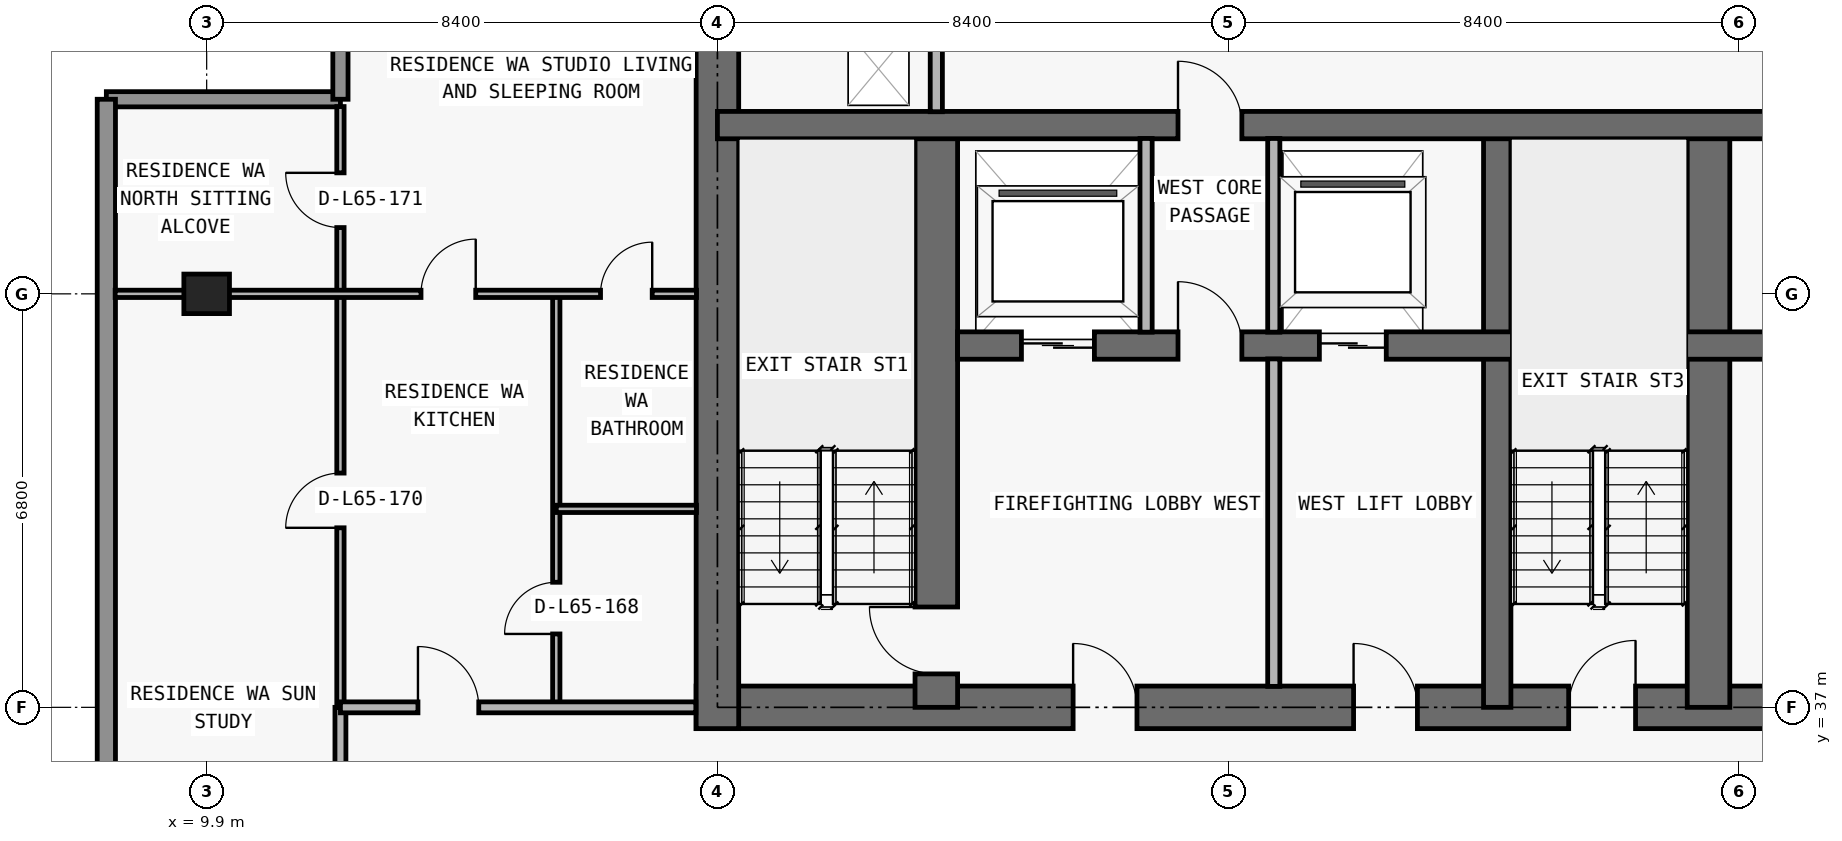
"""IFC4 building model, lengths in metres.
Left out: names, types, materials, properties, quantities, classifications, styles, units other than length and angle.
Written with IfcOpenShell. Run it as: python <this file> out.ifc"""

import sys

from ifc_helpers import new_model, si_unit, direction, frame, frame_2d, origin, origin_2d, place, context, subcontext, project, spatial, rectangle, extrude, element, fill, save


model = new_model("IFC4")
c1 = context("Model", 3, precision=1e-05, world=origin(), true_north=direction((0.0, 1.0)))
c2 = subcontext(c1, "Body", "Model", "MODEL_VIEW")
j1 = project(units=[si_unit("LENGTHUNIT", "METRE"), si_unit("PLANEANGLEUNIT", "RADIAN")], contexts=[c1])
p1 = place(None, origin())
s1 = spatial("IfcSite", under=j1, at=p1, CompositionType="ELEMENT")
p2 = place(p1, origin())
s2 = spatial("IfcBuilding", under=s1, at=p2, CompositionType="ELEMENT")
p3 = place(p2, frame((0.0, 0.0, 233.1)))
s3 = spatial("IfcBuildingStorey", under=s2, at=p3, CompositionType="ELEMENT", Elevation=233.1)
p4 = place(p3, frame((9.9, 43.8, 0.0), z_axis=(0.0, 0.0, 1.0), x_axis=(1.0, 0.0, 0.0)))
e1 = element("IfcColumn", 1, at=p4, inside=s3, PredefinedType="COLUMN", context=c2, shape_type="SweptSolid", body=[
    extrude(rectangle(XDim=0.75, YDim=0.65, at=origin_2d()), origin(), (0.0, 0.0, 1.0), 3.05),
])
p5 = place(p3, frame((17.95, 37.0, 0.0), z_axis=(0.0, 0.0, 1.0), x_axis=(1.0, 0.0, 0.0)))
e2 = element("IfcWall", 2, at=p5, inside=s3, PredefinedType="SHEAR", context=c2, shape_type="SweptSolid", body=[
    extrude(rectangle(XDim=41.9, YDim=0.7, at=frame_2d((20.95, 0.0))), origin(), (0.0, 0.0, 1.0), 3.05),
])
p6 = place(p5, frame((14.35, 0.0, 0.0)))
e3 = element("IfcOpeningElement", 3, at=p6, cuts=e2, PredefinedType="OPENING", context=c2, shape_type="SweptSolid", body=[
    extrude(rectangle(XDim=1.1, YDim=2.15, at=frame_2d((0.55, 1.075))), frame((0.0, 0.36, 0.0), z_axis=(0.0, -1.0, 0.0), x_axis=(1.0, 0.0, 0.0)), (0.0, 0.0, 1.0), 0.72),
])
p7 = place(p5, frame((6.2, 0.0, 0.0)))
e4 = element("IfcOpeningElement", 4, at=p7, cuts=e2, PredefinedType="OPENING", context=c2, shape_type="SweptSolid", body=[
    extrude(rectangle(XDim=1.05, YDim=2.15, at=frame_2d((0.525, 1.075))), frame((0.0, 0.36, 0.0), z_axis=(0.0, -1.0, 0.0), x_axis=(1.0, 0.0, 0.0)), (0.0, 0.0, 1.0), 0.72),
])
p8 = place(p5, frame((34.7, 0.0, 0.0)))
e5 = element("IfcOpeningElement", 5, at=p8, cuts=e2, PredefinedType="OPENING", context=c2, shape_type="SweptSolid", body=[
    extrude(rectangle(XDim=1.05, YDim=2.15, at=frame_2d((0.525, 1.075))), frame((0.0, 0.36, 0.0), z_axis=(0.0, -1.0, 0.0), x_axis=(1.0, 0.0, 0.0)), (0.0, 0.0, 1.0), 0.72),
])
p9 = place(p5, frame((10.812, 0.0, 0.0)))
e6 = element("IfcOpeningElement", 6, at=p9, cuts=e2, PredefinedType="OPENING", context=c2, shape_type="SweptSolid", body=[
    extrude(rectangle(XDim=1.05, YDim=2.15, at=frame_2d((0.525, 1.075))), frame((0.0, 0.36, 0.0), z_axis=(0.0, -1.0, 0.0), x_axis=(1.0, 0.0, 0.0)), (0.0, 0.0, 1.0), 0.72),
])
p10 = place(p5, frame((24.05, 0.0, 0.0)))
e7 = element("IfcOpeningElement", 7, at=p10, cuts=e2, PredefinedType="OPENING", context=c2, shape_type="SweptSolid", body=[
    extrude(rectangle(XDim=1.05, YDim=2.15, at=frame_2d((0.525, 1.075))), frame((0.0, 0.36, 0.0), z_axis=(0.0, -1.0, 0.0), x_axis=(1.0, 0.0, 0.0)), (0.0, 0.0, 1.0), 0.72),
])
p11 = place(p3, frame((18.3, 36.65, 0.0), z_axis=(0.0, 0.0, 1.0), x_axis=(0.0, 1.0, 0.0)))
e8 = element("IfcWall", 8, at=p11, inside=s3, PredefinedType="SHEAR", context=c2, shape_type="SweptSolid", body=[
    extrude(rectangle(XDim=13.95, YDim=0.7, at=frame_2d((6.975, 0.0))), origin(), (0.0, 0.0, 1.0), 3.05),
])
p12 = place(p3, frame((21.9, 37.0, 0.0), z_axis=(0.0, 0.0, 1.0), x_axis=(0.0, 1.0, 0.0)))
e9 = element("IfcWall", 9, at=p12, inside=s3, PredefinedType="SHEAR", context=c2, shape_type="SweptSolid", body=[
    extrude(rectangle(XDim=9.575, YDim=0.7, at=frame_2d((4.788, 0.0))), origin(), (0.0, 0.0, 1.0), 3.05),
])
p13 = place(p12, frame((0.55, 0.0, 0.0)))
e10 = element("IfcOpeningElement", 10, at=p13, cuts=e9, PredefinedType="OPENING", context=c2, shape_type="SweptSolid", body=[
    extrude(rectangle(XDim=1.1, YDim=2.15, at=frame_2d((0.55, 1.075))), frame((0.0, 0.36, 0.0), z_axis=(0.0, -1.0, 0.0), x_axis=(1.0, 0.0, 0.0)), (0.0, 0.0, 1.0), 0.72),
])
p14 = place(p3, frame((31.125, 37.0, 0.0), z_axis=(0.0, 0.0, 1.0), x_axis=(0.0, 1.0, 0.0)))
e11 = element("IfcWall", 11, at=p14, inside=s3, PredefinedType="SHEAR", context=c2, shape_type="SweptSolid", body=[
    extrude(rectangle(XDim=9.575, YDim=0.45, at=frame_2d((4.788, 0.0))), origin(), (0.0, 0.0, 1.0), 3.05),
])
p15 = place(p3, frame((34.6, 37.0, 0.0), z_axis=(0.0, 0.0, 1.0), x_axis=(0.0, 1.0, 0.0)))
e12 = element("IfcWall", 12, at=p15, inside=s3, PredefinedType="SHEAR", context=c2, shape_type="SweptSolid", body=[
    extrude(rectangle(XDim=9.575, YDim=0.7, at=frame_2d((4.788, 0.0))), origin(), (0.0, 0.0, 1.0), 3.05),
])
p16 = place(p3, frame((22.25, 42.95, 0.0), z_axis=(0.0, 0.0, 1.0), x_axis=(1.0, 0.0, 0.0)))
e13 = element("IfcWall", 13, at=p16, inside=s3, PredefinedType="SHEAR", context=c2, shape_type="SweptSolid", body=[
    extrude(rectangle(XDim=33.3, YDim=0.45, at=frame_2d((16.65, 0.0))), origin(), (0.0, 0.0, 1.0), 3.05),
])
p17 = place(p16, frame((1.05, 0.0, 0.0)))
e14 = element("IfcOpeningElement", 14, at=p17, cuts=e13, PredefinedType="OPENING", context=c2, shape_type="SweptSolid", body=[
    extrude(rectangle(XDim=1.2, YDim=2.2, at=frame_2d((0.6, 1.1))), frame((0.0, 0.235, 0.0), z_axis=(0.0, -1.0, 0.0), x_axis=(1.0, 0.0, 0.0)), (0.0, 0.0, 1.0), 0.47),
])
p18 = place(p16, frame((31.05, 0.0, 0.0)))
e15 = element("IfcOpeningElement", 15, at=p18, cuts=e13, PredefinedType="OPENING", context=c2, shape_type="SweptSolid", body=[
    extrude(rectangle(XDim=1.2, YDim=2.2, at=frame_2d((0.6, 1.1))), frame((0.0, 0.235, 0.0), z_axis=(0.0, -1.0, 0.0), x_axis=(1.0, 0.0, 0.0)), (0.0, 0.0, 1.0), 0.47),
])
p19 = place(p16, frame((26.45, 0.0, 0.0)))
e16 = element("IfcOpeningElement", 16, at=p19, cuts=e13, PredefinedType="OPENING", context=c2, shape_type="SweptSolid", body=[
    extrude(rectangle(XDim=1.1, YDim=2.2, at=frame_2d((0.55, 1.1))), frame((0.0, 0.235, 0.0), z_axis=(0.0, -1.0, 0.0), x_axis=(1.0, 0.0, 0.0)), (0.0, 0.0, 1.0), 0.47),
])
p20 = place(p16, frame((5.95, 0.0, 0.0)))
e17 = element("IfcOpeningElement", 17, at=p20, cuts=e13, PredefinedType="OPENING", context=c2, shape_type="SweptSolid", body=[
    extrude(rectangle(XDim=1.1, YDim=2.2, at=frame_2d((0.55, 1.1))), frame((0.0, 0.235, 0.0), z_axis=(0.0, -1.0, 0.0), x_axis=(1.0, 0.0, 0.0)), (0.0, 0.0, 1.0), 0.47),
])
p21 = place(p16, frame((3.625, 0.0, 0.0)))
e18 = element("IfcOpeningElement", 18, at=p21, cuts=e13, PredefinedType="OPENING", context=c2, shape_type="SweptSolid", body=[
    extrude(rectangle(XDim=1.05, YDim=2.15, at=frame_2d((0.525, 1.075))), frame((0.0, 0.235, 0.0), z_axis=(0.0, -1.0, 0.0), x_axis=(1.0, 0.0, 0.0)), (0.0, 0.0, 1.0), 0.47),
])
p22 = place(p16, frame((28.675, 0.0, 0.0)))
e19 = element("IfcOpeningElement", 19, at=p22, cuts=e13, PredefinedType="OPENING", context=c2, shape_type="SweptSolid", body=[
    extrude(rectangle(XDim=1.05, YDim=2.15, at=frame_2d((0.525, 1.075))), frame((0.0, 0.235, 0.0), z_axis=(0.0, -1.0, 0.0), x_axis=(1.0, 0.0, 0.0)), (0.0, 0.0, 1.0), 0.47),
])
p23 = place(p16, frame((15.225, 0.0, 0.0)))
e20 = element("IfcOpeningElement", 20, at=p23, cuts=e13, PredefinedType="OPENING", context=c2, shape_type="SweptSolid", body=[
    extrude(rectangle(XDim=1.0, YDim=2.2, at=frame_2d((0.5, 1.1))), frame((0.0, 0.235, 0.0), z_axis=(0.0, -1.0, 0.0), x_axis=(1.0, 0.0, 0.0)), (0.0, 0.0, 1.0), 0.47),
])
p24 = place(p16, frame((21.975, 0.0, 0.0)))
e21 = element("IfcOpeningElement", 21, at=p24, cuts=e13, PredefinedType="OPENING", context=c2, shape_type="SweptSolid", body=[
    extrude(rectangle(XDim=1.0, YDim=2.2, at=frame_2d((0.5, 1.1))), frame((0.0, 0.235, 0.0), z_axis=(0.0, -1.0, 0.0), x_axis=(1.0, 0.0, 0.0)), (0.0, 0.0, 1.0), 0.47),
])
p25 = place(p3, frame((18.3, 46.575, 0.0), z_axis=(0.0, 0.0, 1.0), x_axis=(1.0, 0.0, 0.0)))
e22 = element("IfcWall", 22, at=p25, inside=s3, PredefinedType="SHEAR", context=c2, shape_type="SweptSolid", body=[
    extrude(rectangle(XDim=41.2, YDim=0.45, at=frame_2d((20.6, 0.0))), origin(), (0.0, 0.0, 1.0), 3.05),
])
p26 = place(p25, frame((7.575, 0.0, 0.0)))
e23 = element("IfcOpeningElement", 23, at=p26, cuts=e22, PredefinedType="OPENING", context=c2, shape_type="SweptSolid", body=[
    extrude(rectangle(XDim=1.05, YDim=2.15, at=frame_2d((0.525, 1.075))), frame((0.0, 0.235, 0.0), z_axis=(0.0, -1.0, 0.0), x_axis=(1.0, 0.0, 0.0)), (0.0, 0.0, 1.0), 0.47),
])
p27 = place(p25, frame((32.625, 0.0, 0.0)))
e24 = element("IfcOpeningElement", 24, at=p27, cuts=e22, PredefinedType="OPENING", context=c2, shape_type="SweptSolid", body=[
    extrude(rectangle(XDim=1.05, YDim=2.15, at=frame_2d((0.525, 1.075))), frame((0.0, 0.235, 0.0), z_axis=(0.0, -1.0, 0.0), x_axis=(1.0, 0.0, 0.0)), (0.0, 0.0, 1.0), 0.47),
])
p28 = place(p3, frame((8.25, 47.0, 0.0), z_axis=(0.0, 0.0, 1.0), x_axis=(1.0, 0.0, 0.0)))
e25 = element("IfcWall", 25, at=p28, inside=s3, PredefinedType="ELEMENTEDWALL", context=c2, shape_type="SweptSolid", body=[
    extrude(rectangle(XDim=3.85, YDim=0.25, at=frame_2d((1.925, 0.0))), origin(), (0.0, 0.0, 1.0), 3.05),
])
p29 = place(p3, frame((12.1, 47.0, 0.0), z_axis=(0.0, 0.0, 1.0), x_axis=(0.0, 1.0, 0.0)))
e26 = element("IfcWall", 26, at=p29, inside=s3, PredefinedType="ELEMENTEDWALL", context=c2, shape_type="SweptSolid", body=[
    extrude(rectangle(XDim=3.45, YDim=0.25, at=frame_2d((1.725, 0.0))), origin(), (0.0, 0.0, 1.0), 3.05),
])
p30 = place(p3, frame((8.25, 30.15, 0.0), z_axis=(0.0, 0.0, 1.0), x_axis=(0.0, 1.0, 0.0)))
e27 = element("IfcWall", 27, at=p30, inside=s3, PredefinedType="STANDARD", context=c2, shape_type="SweptSolid", body=[
    extrude(rectangle(XDim=16.85, YDim=0.3, at=frame_2d((8.425, 0.0))), origin(), (0.0, 0.0, 1.0), 3.05),
])
p31 = place(p3, frame((12.1, 34.005, 0.0), z_axis=(0.0, 0.0, 1.0), x_axis=(0.0, 1.0, 0.0)))
e28 = element("IfcWall", 28, at=p31, inside=s3, PredefinedType="PARTITIONING", context=c2, shape_type="SweptSolid", body=[
    extrude(rectangle(XDim=2.995, YDim=0.18, at=frame_2d((1.498, 0.0))), origin(), (0.0, 0.0, 1.0), 2.725),
])
p32 = place(p3, frame((12.1, 37.005, 0.0), z_axis=(0.0, 0.0, 1.0), x_axis=(0.0, 1.0, 0.0)))
e29 = element("IfcWall", 29, at=p32, inside=s3, PredefinedType="PARTITIONING", context=c2, shape_type="SweptSolid", body=[
    extrude(rectangle(XDim=9.875, YDim=0.12, at=frame_2d((4.938, 0.0))), origin(), (0.0, 0.0, 1.0), 2.725),
])
p33 = place(p32, frame((2.948, 0.0, 0.0)))
e30 = element("IfcOpeningElement", 30, at=p33, cuts=e29, PredefinedType="OPENING", context=c2, shape_type="SweptSolid", body=[
    extrude(rectangle(XDim=0.9, YDim=2.15, at=frame_2d((0.45, 1.075))), frame((0.0, 0.07, 0.0), z_axis=(0.0, -1.0, 0.0), x_axis=(1.0, 0.0, 0.0)), (0.0, 0.0, 1.0), 0.14),
])
p34 = place(p32, frame((7.885, 0.0, 0.0)))
e31 = element("IfcOpeningElement", 31, at=p34, cuts=e29, PredefinedType="OPENING", context=c2, shape_type="SweptSolid", body=[
    extrude(rectangle(XDim=0.9, YDim=2.15, at=frame_2d((0.45, 1.075))), frame((0.0, 0.07, 0.0), z_axis=(0.0, -1.0, 0.0), x_axis=(1.0, 0.0, 0.0)), (0.0, 0.0, 1.0), 0.14),
])
p35 = place(p3, frame((15.65, 37.0, 0.0), z_axis=(0.0, 0.0, 1.0), x_axis=(0.0, 1.0, 0.0)))
e32 = element("IfcWall", 32, at=p35, inside=s3, PredefinedType="PARTITIONING", context=c2, shape_type="SweptSolid", body=[
    extrude(rectangle(XDim=6.8, YDim=0.12, at=frame_2d((3.4, 0.0))), origin(), (0.0, 0.0, 1.0), 3.05),
])
p36 = place(p35, frame((1.207, 0.0, 0.0)))
e33 = element("IfcOpeningElement", 33, at=p36, cuts=e32, PredefinedType="OPENING", context=c2, shape_type="SweptSolid", body=[
    extrude(rectangle(XDim=0.85, YDim=2.1, at=frame_2d((0.425, 1.05))), frame((0.0, 0.07, 0.0), z_axis=(0.0, -1.0, 0.0), x_axis=(1.0, 0.0, 0.0)), (0.0, 0.0, 1.0), 0.14),
])
p37 = place(p3, frame((21.9, 46.795, 0.0), z_axis=(0.0, 0.0, 1.0), x_axis=(0.0, 1.0, 0.0)))
e34 = element("IfcWall", 34, at=p37, inside=s3, PredefinedType="PARTITIONING", context=c2, shape_type="SweptSolid", body=[
    extrude(rectangle(XDim=3.16, YDim=0.2, at=frame_2d((1.58, 0.0))), origin(), (0.0, 0.0, 1.0), 3.05),
])
p38 = place(p3, frame((25.35, 43.17, 0.0), z_axis=(0.0, 0.0, 1.0), x_axis=(0.0, 1.0, 0.0)))
e35 = element("IfcWall", 35, at=p38, inside=s3, PredefinedType="PARTITIONING", context=c2, shape_type="SweptSolid", body=[
    extrude(rectangle(XDim=3.185, YDim=0.2, at=frame_2d((1.593, 0.0))), origin(), (0.0, 0.0, 1.0), 3.05),
])
p39 = place(p3, frame((27.45, 37.345, 0.0), z_axis=(0.0, 0.0, 1.0), x_axis=(0.0, 1.0, 0.0)))
e36 = element("IfcWall", 36, at=p39, inside=s3, PredefinedType="PARTITIONING", context=c2, shape_type="SweptSolid", body=[
    extrude(rectangle(XDim=5.385, YDim=0.2, at=frame_2d((2.692, 0.0))), origin(), (0.0, 0.0, 1.0), 3.05),
])
p40 = place(p3, frame((27.45, 43.17, 0.0), z_axis=(0.0, 0.0, 1.0), x_axis=(0.0, 1.0, 0.0)))
e37 = element("IfcWall", 37, at=p40, inside=s3, PredefinedType="PARTITIONING", context=c2, shape_type="SweptSolid", body=[
    extrude(rectangle(XDim=3.185, YDim=0.2, at=frame_2d((1.593, 0.0))), origin(), (0.0, 0.0, 1.0), 3.05),
])
p41 = place(p3, frame((12.1, 37.0, 0.0), z_axis=(0.0, 0.0, 1.0), x_axis=(1.0, 0.0, 0.0)))
e38 = element("IfcWall", 38, at=p41, inside=s3, PredefinedType="PARTITIONING", context=c2, shape_type="SweptSolid", body=[
    extrude(rectangle(XDim=5.845, YDim=0.18, at=frame_2d((2.922, 0.0))), origin(), (0.0, 0.0, 1.0), 3.05),
])
p42 = place(p41, frame((1.275, 0.0, 0.0)))
e39 = element("IfcOpeningElement", 39, at=p42, cuts=e38, PredefinedType="OPENING", context=c2, shape_type="SweptSolid", body=[
    extrude(rectangle(XDim=1.0, YDim=2.2, at=frame_2d((0.5, 1.1))), frame((0.0, 0.1, 0.0), z_axis=(0.0, -1.0, 0.0), x_axis=(1.0, 0.0, 0.0)), (0.0, 0.0, 1.0), 0.2),
])
p43 = place(p3, frame((15.65, 40.264, 0.0), z_axis=(0.0, 0.0, 1.0), x_axis=(1.0, 0.0, 0.0)))
e40 = element("IfcWall", 40, at=p43, inside=s3, PredefinedType="PARTITIONING", context=c2, shape_type="SweptSolid", body=[
    extrude(rectangle(XDim=2.305, YDim=0.12, at=frame_2d((1.153, 0.0))), origin(), (0.0, 0.0, 1.0), 3.05),
])
p44 = place(p3, frame((8.395, 43.8, 0.0), z_axis=(0.0, 0.0, 1.0), x_axis=(1.0, 0.0, 0.0)))
e41 = element("IfcWall", 41, at=p44, inside=s3, PredefinedType="PARTITIONING", context=c2, shape_type="SweptSolid", body=[
    extrude(rectangle(XDim=9.56, YDim=0.12, at=frame_2d((4.78, 0.0))), origin(), (0.0, 0.0, 1.0), 2.418),
])
p45 = place(p44, frame((5.03, 0.0, 0.0)))
e42 = element("IfcOpeningElement", 42, at=p45, cuts=e41, PredefinedType="OPENING", context=c2, shape_type="SweptSolid", body=[
    extrude(rectangle(XDim=0.9, YDim=2.15, at=frame_2d((0.45, 1.075))), frame((0.0, 0.07, 0.0), z_axis=(0.0, -1.0, 0.0), x_axis=(1.0, 0.0, 0.0)), (0.0, 0.0, 1.0), 0.14),
])
p46 = place(p44, frame((7.982, 0.0, 0.0)))
e43 = element("IfcOpeningElement", 43, at=p46, cuts=e41, PredefinedType="OPENING", context=c2, shape_type="SweptSolid", body=[
    extrude(rectangle(XDim=0.85, YDim=2.1, at=frame_2d((0.425, 1.05))), frame((0.0, 0.07, 0.0), z_axis=(0.0, -1.0, 0.0), x_axis=(1.0, 0.0, 0.0)), (0.0, 0.0, 1.0), 0.14),
])
p47 = place(p17, origin())
e44 = element("IfcDoor", 44, at=p47, inside=s3, OperationType="DOUBLE_DOOR_SLIDING", PredefinedType="DOOR", context=c2, shape_type="SweptSolid", body=[
    extrude(rectangle(XDim=1.2, YDim=2.2, at=frame_2d((0.6, 1.1))), frame((0.0, 0.025, 0.0), z_axis=(0.0, -1.0, 0.0), x_axis=(1.0, 0.0, 0.0)), (0.0, 0.0, 1.0), 0.05),
])
fill(e14, e44)
p48 = place(p20, origin())
e45 = element("IfcDoor", 45, at=p48, inside=s3, OperationType="DOUBLE_DOOR_SLIDING", PredefinedType="DOOR", context=c2, shape_type="SweptSolid", body=[
    extrude(rectangle(XDim=1.1, YDim=2.2, at=frame_2d((0.55, 1.1))), frame((0.0, 0.025, 0.0), z_axis=(0.0, -1.0, 0.0), x_axis=(1.0, 0.0, 0.0)), (0.0, 0.0, 1.0), 0.05),
])
fill(e17, e45)
p49 = place(p6, origin())
e46 = element("IfcDoor", 46, at=p49, inside=s3, OperationType="SINGLE_SWING_RIGHT", PredefinedType="DOOR", context=c2, shape_type="SweptSolid", body=[
    extrude(rectangle(XDim=1.1, YDim=2.15, at=frame_2d((0.55, 1.075))), frame((0.0, 0.025, 0.0), z_axis=(0.0, -1.0, 0.0), x_axis=(1.0, 0.0, 0.0)), (0.0, 0.0, 1.0), 0.05),
])
fill(e3, e46)
p50 = place(p7, origin())
e47 = element("IfcDoor", 47, at=p50, inside=s3, OperationType="SINGLE_SWING_LEFT", PredefinedType="DOOR", context=c2, shape_type="SweptSolid", body=[
    extrude(rectangle(XDim=1.05, YDim=2.15, at=frame_2d((0.525, 1.075))), frame((0.0, 0.025, 0.0), z_axis=(0.0, -1.0, 0.0), x_axis=(1.0, 0.0, 0.0)), (0.0, 0.0, 1.0), 0.05),
])
fill(e4, e47)
p51 = place(p13, origin())
e48 = element("IfcDoor", 48, at=p51, inside=s3, OperationType="SINGLE_SWING_RIGHT", PredefinedType="DOOR", context=c2, shape_type="SweptSolid", body=[
    extrude(rectangle(XDim=1.1, YDim=2.15, at=frame_2d((0.55, 1.075))), frame((0.0, 0.025, 0.0), z_axis=(0.0, -1.0, 0.0), x_axis=(1.0, 0.0, 0.0)), (0.0, 0.0, 1.0), 0.05),
])
fill(e10, e48)
p52 = place(p21, origin())
e49 = element("IfcDoor", 49, at=p52, inside=s3, OperationType="SINGLE_SWING_LEFT", PredefinedType="DOOR", context=c2, shape_type="SweptSolid", body=[
    extrude(rectangle(XDim=1.05, YDim=2.15, at=frame_2d((0.525, 1.075))), frame((0.0, 0.025, 0.0), z_axis=(0.0, -1.0, 0.0), x_axis=(1.0, 0.0, 0.0)), (0.0, 0.0, 1.0), 0.05),
])
fill(e18, e49)
p53 = place(p9, origin())
e50 = element("IfcDoor", 50, at=p53, inside=s3, OperationType="SINGLE_SWING_LEFT", PredefinedType="DOOR", context=c2, shape_type="SweptSolid", body=[
    extrude(rectangle(XDim=1.05, YDim=2.15, at=frame_2d((0.525, 1.075))), frame((0.0, 0.025, 0.0), z_axis=(0.0, -1.0, 0.0), x_axis=(1.0, 0.0, 0.0)), (0.0, 0.0, 1.0), 0.05),
])
fill(e6, e50)
p54 = place(p26, origin())
e51 = element("IfcDoor", 51, at=p54, inside=s3, OperationType="SINGLE_SWING_LEFT", PredefinedType="DOOR", context=c2, shape_type="SweptSolid", body=[
    extrude(rectangle(XDim=1.05, YDim=2.15, at=frame_2d((0.525, 1.075))), frame((0.0, 0.025, 0.0), z_axis=(0.0, -1.0, 0.0), x_axis=(1.0, 0.0, 0.0)), (0.0, 0.0, 1.0), 0.05),
])
fill(e23, e51)
p55 = place(p42, origin())
e52 = element("IfcDoor", 52, at=p55, inside=s3, OperationType="SINGLE_SWING_LEFT", PredefinedType="DOOR", context=c2, shape_type="SweptSolid", body=[
    extrude(rectangle(XDim=1.0, YDim=2.2, at=frame_2d((0.5, 1.1))), frame((0.0, 0.025, 0.0), z_axis=(0.0, -1.0, 0.0), x_axis=(1.0, 0.0, 0.0)), (0.0, 0.0, 1.0), 0.05),
])
fill(e39, e52)
p56 = place(p45, origin())
e53 = element("IfcDoor", 53, at=p56, inside=s3, OperationType="SINGLE_SWING_RIGHT", PredefinedType="DOOR", context=c2, shape_type="SweptSolid", body=[
    extrude(rectangle(XDim=0.9, YDim=2.15, at=frame_2d((0.45, 1.075))), frame((0.0, 0.025, 0.0), z_axis=(0.0, -1.0, 0.0), x_axis=(1.0, 0.0, 0.0)), (0.0, 0.0, 1.0), 0.05),
])
fill(e42, e53)
p57 = place(p36, origin())
e54 = element("IfcDoor", 54, at=p57, inside=s3, OperationType="SINGLE_SWING_LEFT", PredefinedType="DOOR", context=c2, shape_type="SweptSolid", body=[
    extrude(rectangle(XDim=0.85, YDim=2.1, at=frame_2d((0.425, 1.05))), frame((0.0, 0.025, 0.0), z_axis=(0.0, -1.0, 0.0), x_axis=(1.0, 0.0, 0.0)), (0.0, 0.0, 1.0), 0.05),
])
fill(e33, e54)
p58 = place(p46, origin())
e55 = element("IfcDoor", 55, at=p58, inside=s3, OperationType="SINGLE_SWING_RIGHT", PredefinedType="DOOR", context=c2, shape_type="SweptSolid", body=[
    extrude(rectangle(XDim=0.85, YDim=2.1, at=frame_2d((0.425, 1.05))), frame((0.0, 0.025, 0.0), z_axis=(0.0, -1.0, 0.0), x_axis=(1.0, 0.0, 0.0)), (0.0, 0.0, 1.0), 0.05),
])
fill(e43, e55)
p59 = place(p33, origin())
e56 = element("IfcDoor", 56, at=p59, inside=s3, OperationType="SINGLE_SWING_LEFT", PredefinedType="DOOR", context=c2, shape_type="SweptSolid", body=[
    extrude(rectangle(XDim=0.9, YDim=2.15, at=frame_2d((0.45, 1.075))), frame((0.0, 0.025, 0.0), z_axis=(0.0, -1.0, 0.0), x_axis=(1.0, 0.0, 0.0)), (0.0, 0.0, 1.0), 0.05),
])
fill(e30, e56)
p60 = place(p34, origin())
e57 = element("IfcDoor", 57, at=p60, inside=s3, OperationType="SINGLE_SWING_RIGHT", PredefinedType="DOOR", context=c2, shape_type="SweptSolid", body=[
    extrude(rectangle(XDim=0.9, YDim=2.15, at=frame_2d((0.45, 1.075))), frame((0.0, 0.025, 0.0), z_axis=(0.0, -1.0, 0.0), x_axis=(1.0, 0.0, 0.0)), (0.0, 0.0, 1.0), 0.05),
])
fill(e31, e57)
save(model, sys.argv[1])
